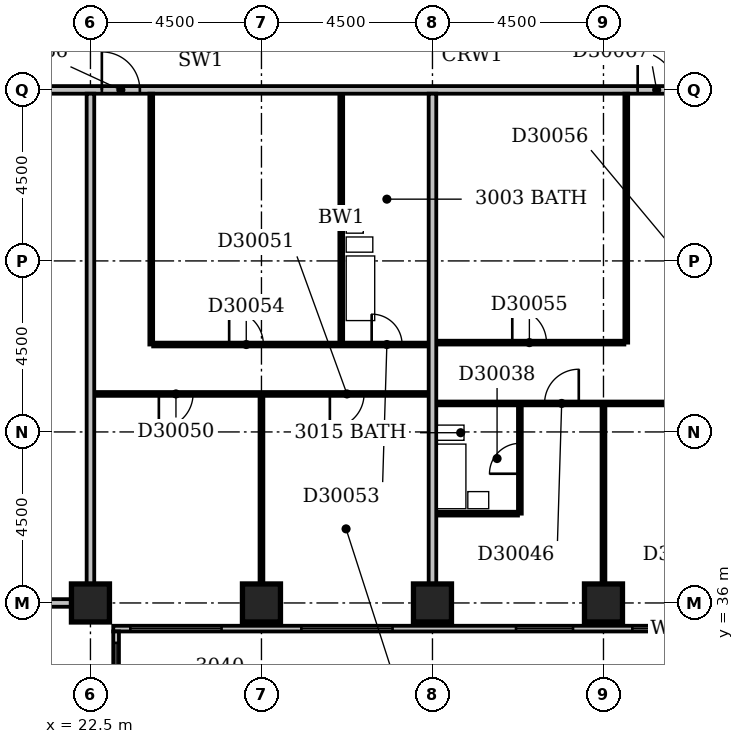
"""IFC4 building model, lengths in metres.
Left out: names, types, materials, properties, quantities, classifications, styles, units other than length and angle.
Written with IfcOpenShell. Run it as: python <this file> out.ifc"""

import sys

from ifc_helpers import new_model, si_unit, direction, frame, frame_2d, origin, origin_2d, place, context, subcontext, project, spatial, rectangle, extrude, element, fill, save


model = new_model("IFC4")
c1 = context("Model", 3, precision=1e-05, world=origin(), true_north=direction((0.0, 1.0)))
c2 = subcontext(c1, "Body", "Model", "MODEL_VIEW")
j1 = project(units=[si_unit("LENGTHUNIT", "METRE"), si_unit("PLANEANGLEUNIT", "RADIAN")], contexts=[c1])
p1 = place(None, origin())
s1 = spatial("IfcSite", under=j1, at=p1, CompositionType="ELEMENT")
p2 = place(p1, origin())
s2 = spatial("IfcBuilding", under=s1, at=p2, CompositionType="ELEMENT")
p3 = place(p2, frame((0.0, 0.0, 123.2)))
s3 = spatial("IfcBuildingStorey", under=s2, at=p3, CompositionType="ELEMENT", Elevation=123.2)
for number, where, z_axis, x_axis in (
    (1, (22.5, 36.0, -0.3), (0.0, 0.0, 1.0), (1.0, 0.0, 0.0)),
    (2, (27.0, 36.0, -0.3), (0.0, 0.0, 1.0), (1.0, 0.0, 0.0)),
    (3, (31.5, 36.0, -0.3), (0.0, 0.0, 1.0), (1.0, 0.0, 0.0)),
    (4, (36.0, 36.0, -0.3), (0.0, 0.0, 1.0), (1.0, 0.0, 0.0)),
):
    element("IfcColumn", number, at=place(p3, frame(where, z_axis=z_axis, x_axis=x_axis)), inside=s3, PredefinedType="COLUMN", context=c2, shape_type="SweptSolid", body=[
        extrude(rectangle(XDim=1.0, YDim=1.0, at=origin_2d()), origin(), (0.0, 0.0, 1.0), 3.6),
    ])
p4 = place(p3, frame((23.175, 17.4, 0.0), z_axis=(0.0, 0.0, 1.0), x_axis=(0.0, 1.0, 0.0)))
e5 = element("IfcWall", 5, at=p4, inside=s3, PredefinedType="STANDARD", context=c2, shape_type="SweptSolid", body=[
    extrude(rectangle(XDim=17.85, YDim=0.15, at=frame_2d((8.925, 0.0))), origin(), (0.0, 0.0, 1.0), 2.7),
])
p5 = place(p4, frame((1.65, 0.0, 0.6)))
e6 = element("IfcOpeningElement", 6, at=p5, cuts=e5, PredefinedType="OPENING", context=c2, shape_type="SweptSolid", body=[
    extrude(rectangle(XDim=2.4, YDim=1.8, at=frame_2d((1.2, 0.9))), frame((0.0, 0.087, 0.0), z_axis=(0.0, -1.0, 0.0), x_axis=(1.0, 0.0, 0.0)), (0.0, 0.0, 1.0), 0.174),
])
p6 = place(p4, frame((6.15, 0.0, 0.6)))
e7 = element("IfcOpeningElement", 7, at=p6, cuts=e5, PredefinedType="OPENING", context=c2, shape_type="SweptSolid", body=[
    extrude(rectangle(XDim=2.4, YDim=1.8, at=frame_2d((1.2, 0.9))), frame((0.0, 0.087, 0.0), z_axis=(0.0, -1.0, 0.0), x_axis=(1.0, 0.0, 0.0)), (0.0, 0.0, 1.0), 0.174),
])
p7 = place(p4, frame((10.433, 0.0, 0.6)))
e8 = element("IfcOpeningElement", 8, at=p7, cuts=e5, PredefinedType="OPENING", context=c2, shape_type="SweptSolid", body=[
    extrude(rectangle(XDim=1.5, YDim=1.8, at=frame_2d((0.75, 0.9))), frame((0.0, 0.087, 0.0), z_axis=(0.0, -1.0, 0.0), x_axis=(1.0, 0.0, 0.0)), (0.0, 0.0, 1.0), 0.174),
])
p8 = place(p4, frame((15.15, 0.0, 0.6)))
e9 = element("IfcOpeningElement", 9, at=p8, cuts=e5, PredefinedType="OPENING", context=c2, shape_type="SweptSolid", body=[
    extrude(rectangle(XDim=2.4, YDim=1.8, at=frame_2d((1.2, 0.9))), frame((0.0, 0.087, 0.0), z_axis=(0.0, -1.0, 0.0), x_axis=(1.0, 0.0, 0.0)), (0.0, 0.0, 1.0), 0.174),
])
p9 = place(p3, frame((23.1, 35.325, 0.0), z_axis=(0.0, 0.0, 1.0), x_axis=(1.0, 0.0, 0.0)))
e10 = element("IfcWall", 10, at=p9, inside=s3, PredefinedType="STANDARD", context=c2, shape_type="SweptSolid", body=[
    extrude(rectangle(XDim=45.15, YDim=0.15, at=frame_2d((22.575, 0.0))), origin(), (0.0, 0.0, 1.0), 2.7),
])
p10 = place(p9, frame((0.45, 0.0, 0.6)))
e11 = element("IfcOpeningElement", 11, at=p10, cuts=e10, PredefinedType="OPENING", context=c2, shape_type="SweptSolid", body=[
    extrude(rectangle(XDim=2.4, YDim=1.8, at=frame_2d((1.2, 0.9))), frame((0.0, 0.087, 0.0), z_axis=(0.0, -1.0, 0.0), x_axis=(1.0, 0.0, 0.0)), (0.0, 0.0, 1.0), 0.174),
])
p11 = place(p9, frame((4.95, 0.0, 0.6)))
e12 = element("IfcOpeningElement", 12, at=p11, cuts=e10, PredefinedType="OPENING", context=c2, shape_type="SweptSolid", body=[
    extrude(rectangle(XDim=2.4, YDim=1.8, at=frame_2d((1.2, 0.9))), frame((0.0, 0.087, 0.0), z_axis=(0.0, -1.0, 0.0), x_axis=(1.0, 0.0, 0.0)), (0.0, 0.0, 1.0), 0.174),
])
p12 = place(p9, frame((10.598, 0.0, 0.6)))
e13 = element("IfcOpeningElement", 13, at=p12, cuts=e10, PredefinedType="OPENING", context=c2, shape_type="SweptSolid", body=[
    extrude(rectangle(XDim=1.5, YDim=1.8, at=frame_2d((0.75, 0.9))), frame((0.0, 0.087, 0.0), z_axis=(0.0, -1.0, 0.0), x_axis=(1.0, 0.0, 0.0)), (0.0, 0.0, 1.0), 0.174),
])
p13 = place(p9, frame((13.66, 0.0, 0.6)))
e14 = element("IfcOpeningElement", 14, at=p13, cuts=e10, PredefinedType="OPENING", context=c2, shape_type="SweptSolid", body=[
    extrude(rectangle(XDim=1.8, YDim=1.8, at=frame_2d((0.9, 0.9))), frame((0.0, 0.087, 0.0), z_axis=(0.0, -1.0, 0.0), x_axis=(1.0, 0.0, 0.0)), (0.0, 0.0, 1.0), 0.174),
])
p14 = place(p9, frame((18.45, 0.0, 0.6)))
e15 = element("IfcOpeningElement", 15, at=p14, cuts=e10, PredefinedType="OPENING", context=c2, shape_type="SweptSolid", body=[
    extrude(rectangle(XDim=2.4, YDim=1.8, at=frame_2d((1.2, 0.9))), frame((0.0, 0.087, 0.0), z_axis=(0.0, -1.0, 0.0), x_axis=(1.0, 0.0, 0.0)), (0.0, 0.0, 1.0), 0.174),
])
p15 = place(p9, frame((22.95, 0.0, 0.6)))
e16 = element("IfcOpeningElement", 16, at=p15, cuts=e10, PredefinedType="OPENING", context=c2, shape_type="SweptSolid", body=[
    extrude(rectangle(XDim=2.4, YDim=1.8, at=frame_2d((1.2, 0.9))), frame((0.0, 0.087, 0.0), z_axis=(0.0, -1.0, 0.0), x_axis=(1.0, 0.0, 0.0)), (0.0, 0.0, 1.0), 0.174),
])
p16 = place(p9, frame((27.45, 0.0, 0.6)))
e17 = element("IfcOpeningElement", 17, at=p16, cuts=e10, PredefinedType="OPENING", context=c2, shape_type="SweptSolid", body=[
    extrude(rectangle(XDim=2.4, YDim=1.8, at=frame_2d((1.2, 0.9))), frame((0.0, 0.087, 0.0), z_axis=(0.0, -1.0, 0.0), x_axis=(1.0, 0.0, 0.0)), (0.0, 0.0, 1.0), 0.174),
])
p17 = place(p9, frame((31.95, 0.0, 0.6)))
e18 = element("IfcOpeningElement", 18, at=p17, cuts=e10, PredefinedType="OPENING", context=c2, shape_type="SweptSolid", body=[
    extrude(rectangle(XDim=2.4, YDim=1.8, at=frame_2d((1.2, 0.9))), frame((0.0, 0.087, 0.0), z_axis=(0.0, -1.0, 0.0), x_axis=(1.0, 0.0, 0.0)), (0.0, 0.0, 1.0), 0.174),
])
p18 = place(p9, frame((36.131, 0.0, 0.6)))
e19 = element("IfcOpeningElement", 19, at=p18, cuts=e10, PredefinedType="OPENING", context=c2, shape_type="SweptSolid", body=[
    extrude(rectangle(XDim=2.4, YDim=1.8, at=frame_2d((1.2, 0.9))), frame((0.0, 0.087, 0.0), z_axis=(0.0, -1.0, 0.0), x_axis=(1.0, 0.0, 0.0)), (0.0, 0.0, 1.0), 0.174),
])
p19 = place(p9, frame((40.95, 0.0, 0.6)))
e20 = element("IfcOpeningElement", 20, at=p19, cuts=e10, PredefinedType="OPENING", context=c2, shape_type="SweptSolid", body=[
    extrude(rectangle(XDim=2.4, YDim=1.8, at=frame_2d((1.2, 0.9))), frame((0.0, 0.087, 0.0), z_axis=(0.0, -1.0, 0.0), x_axis=(1.0, 0.0, 0.0)), (0.0, 0.0, 1.0), 0.174),
])
for number, where, z_axis, x_axis in (
    (21, (9.1, 36.0, 0.0), (0.0, 0.0, 1.0), (1.0, 0.0, 0.0)),
    (22, (22.5, 36.5, 0.0), (0.0, 0.0, 1.0), (0.0, 1.0, 0.0)),
):
    element("IfcWall", number, at=place(p3, frame(where, z_axis=z_axis, x_axis=x_axis)), inside=s3, PredefinedType="PARTITIONING", context=c2, shape_type="SweptSolid", body=[
        extrude(rectangle(XDim=12.9, YDim=0.2, at=frame_2d((6.45, 0.0))), origin(), (0.0, 0.0, 1.0), 3.3),
    ])
p20 = place(p3, frame((27.0, 36.5, 0.0), z_axis=(0.0, 0.0, 1.0), x_axis=(0.0, 1.0, 0.0)))
e23 = element("IfcWall", 23, at=p20, inside=s3, PredefinedType="PARTITIONING", context=c2, shape_type="SweptSolid", body=[
    extrude(rectangle(XDim=4.95, YDim=0.1, at=frame_2d((2.475, 0.0))), origin(), (0.0, 0.0, 1.0), 2.6),
])
p21 = place(p3, frame((31.5, 36.5, 0.0), z_axis=(0.0, 0.0, 1.0), x_axis=(0.0, 1.0, 0.0)))
e24 = element("IfcWall", 24, at=p21, inside=s3, PredefinedType="PARTITIONING", context=c2, shape_type="SweptSolid", body=[
    extrude(rectangle(XDim=12.9, YDim=0.2, at=frame_2d((6.45, 0.0))), origin(), (0.0, 0.0, 1.0), 3.3),
])
p22 = place(p3, frame((36.0, 36.5, 0.0), z_axis=(0.0, 0.0, 1.0), x_axis=(0.0, 1.0, 0.0)))
e25 = element("IfcWall", 25, at=p22, inside=s3, PredefinedType="PARTITIONING", context=c2, shape_type="SweptSolid", body=[
    extrude(rectangle(XDim=4.7, YDim=0.1, at=frame_2d((2.35, 0.0))), origin(), (0.0, 0.0, 1.0), 2.4),
])
p23 = place(p3, frame((31.6, 38.35, 0.0), z_axis=(0.0, 0.0, 1.0), x_axis=(1.0, 0.0, 0.0)))
e26 = element("IfcWall", 26, at=p23, inside=s3, PredefinedType="PLUMBINGWALL", context=c2, shape_type="SweptSolid", body=[
    extrude(rectangle(XDim=2.15, YDim=0.1, at=frame_2d((1.075, 0.0))), origin(), (0.0, 0.0, 1.0), 3.3),
])
p24 = place(p3, frame((33.8, 38.35, 0.0), z_axis=(0.0, 0.0, 1.0), x_axis=(0.0, 1.0, 0.0)))
e27 = element("IfcWall", 27, at=p24, inside=s3, PredefinedType="PLUMBINGWALL", context=c2, shape_type="SweptSolid", body=[
    extrude(rectangle(XDim=2.85, YDim=0.1, at=frame_2d((1.425, 0.0))), origin(), (0.0, 0.0, 1.0), 3.3),
])
p25 = place(p24, frame((1.05, 0.0, 0.0)))
e28 = element("IfcOpeningElement", 28, at=p25, cuts=e27, PredefinedType="OPENING", context=c2, shape_type="SweptSolid", body=[
    extrude(rectangle(XDim=0.8, YDim=2.1, at=frame_2d((0.4, 1.05))), frame((0.0, 0.062, 0.0), z_axis=(0.0, -1.0, 0.0), x_axis=(1.0, 0.0, 0.0)), (0.0, 0.0, 1.0), 0.124),
])
p26 = place(p3, frame((31.6, 41.25, 0.0), z_axis=(0.0, 0.0, 1.0), x_axis=(1.0, 0.0, 0.0)))
e29 = element("IfcWall", 29, at=p26, inside=s3, PredefinedType="PARTITIONING", context=c2, shape_type="SweptSolid", body=[
    extrude(rectangle(XDim=17.8, YDim=0.1, at=frame_2d((8.9, 0.0))), origin(), (0.0, 0.0, 1.0), 3.3),
])
p27 = place(p26, frame((2.85, 0.0, 0.0)))
e30 = element("IfcOpeningElement", 30, at=p27, cuts=e29, PredefinedType="OPENING", context=c2, shape_type="SweptSolid", body=[
    extrude(rectangle(XDim=0.9, YDim=2.1, at=frame_2d((0.45, 1.05))), frame((0.0, 0.062, 0.0), z_axis=(0.0, -1.0, 0.0), x_axis=(1.0, 0.0, 0.0)), (0.0, 0.0, 1.0), 0.124),
])
p28 = place(p26, frame((8.4, 0.0, 0.0)))
e31 = element("IfcOpeningElement", 31, at=p28, cuts=e29, PredefinedType="OPENING", context=c2, shape_type="SweptSolid", body=[
    extrude(rectangle(XDim=0.9, YDim=2.1, at=frame_2d((0.45, 1.05))), frame((0.0, 0.062, 0.0), z_axis=(0.0, -1.0, 0.0), x_axis=(1.0, 0.0, 0.0)), (0.0, 0.0, 1.0), 0.124),
])
p29 = place(p26, frame((14.05, 0.0, 0.0)))
e32 = element("IfcOpeningElement", 32, at=p29, cuts=e29, PredefinedType="OPENING", context=c2, shape_type="SweptSolid", body=[
    extrude(rectangle(XDim=0.9, YDim=2.1, at=frame_2d((0.45, 1.05))), frame((0.0, 0.062, 0.0), z_axis=(0.0, -1.0, 0.0), x_axis=(1.0, 0.0, 0.0)), (0.0, 0.0, 1.0), 0.124),
])
p30 = place(p3, frame((22.6, 41.5, 0.0), z_axis=(0.0, 0.0, 1.0), x_axis=(1.0, 0.0, 0.0)))
e33 = element("IfcWall", 33, at=p30, inside=s3, PredefinedType="PARTITIONING", context=c2, shape_type="SweptSolid", body=[
    extrude(rectangle(XDim=8.8, YDim=0.1, at=frame_2d((4.4, 0.0))), origin(), (0.0, 0.0, 1.0), 3.3),
])
p31 = place(p30, frame((1.7, 0.0, 0.0)))
e34 = element("IfcOpeningElement", 34, at=p31, cuts=e33, PredefinedType="OPENING", context=c2, shape_type="SweptSolid", body=[
    extrude(rectangle(XDim=0.9, YDim=2.1, at=frame_2d((0.45, 1.05))), frame((0.0, 0.062, 0.0), z_axis=(0.0, -1.0, 0.0), x_axis=(1.0, 0.0, 0.0)), (0.0, 0.0, 1.0), 0.124),
])
p32 = place(p30, frame((6.2, 0.0, 0.0)))
e35 = element("IfcOpeningElement", 35, at=p32, cuts=e33, PredefinedType="OPENING", context=c2, shape_type="SweptSolid", body=[
    extrude(rectangle(XDim=0.9, YDim=2.1, at=frame_2d((0.45, 1.05))), frame((0.0, 0.062, 0.0), z_axis=(0.0, -1.0, 0.0), x_axis=(1.0, 0.0, 0.0)), (0.0, 0.0, 1.0), 0.124),
])
p33 = place(p3, frame((24.1, 42.8, 0.0), z_axis=(0.0, 0.0, 1.0), x_axis=(0.0, 1.0, 0.0)))
e36 = element("IfcWall", 36, at=p33, inside=s3, PredefinedType="PARTITIONING", context=c2, shape_type="SweptSolid", body=[
    extrude(rectangle(XDim=6.6, YDim=0.1, at=frame_2d((3.3, 0.0))), origin(), (0.0, 0.0, 1.0), 3.3),
])
p34 = place(p3, frame((24.15, 42.8, 0.0), z_axis=(0.0, 0.0, 1.0), x_axis=(1.0, 0.0, 0.0)))
e37 = element("IfcWall", 37, at=p34, inside=s3, PredefinedType="PARTITIONING", context=c2, shape_type="SweptSolid", body=[
    extrude(rectangle(XDim=7.25, YDim=0.1, at=frame_2d((3.625, 0.0))), origin(), (0.0, 0.0, 1.0), 3.3),
])
p35 = place(p34, frame((5.75, 0.0, 0.0)))
e38 = element("IfcOpeningElement", 38, at=p35, cuts=e37, PredefinedType="OPENING", context=c2, shape_type="SweptSolid", body=[
    extrude(rectangle(XDim=0.8, YDim=2.1, at=frame_2d((0.4, 1.05))), frame((0.0, 0.062, 0.0), z_axis=(0.0, -1.0, 0.0), x_axis=(1.0, 0.0, 0.0)), (0.0, 0.0, 1.0), 0.124),
])
p36 = place(p34, frame((2.0, 0.0, 0.0)))
e39 = element("IfcOpeningElement", 39, at=p36, cuts=e37, PredefinedType="OPENING", context=c2, shape_type="SweptSolid", body=[
    extrude(rectangle(XDim=0.9, YDim=2.1, at=frame_2d((0.45, 1.05))), frame((0.0, 0.062, 0.0), z_axis=(0.0, -1.0, 0.0), x_axis=(1.0, 0.0, 0.0)), (0.0, 0.0, 1.0), 0.124),
])
p37 = place(p3, frame((29.1, 42.85, 0.0), z_axis=(0.0, 0.0, 1.0), x_axis=(0.0, 1.0, 0.0)))
e40 = element("IfcWall", 40, at=p37, inside=s3, PredefinedType="PLUMBINGWALL", context=c2, shape_type="SweptSolid", body=[
    extrude(rectangle(XDim=6.55, YDim=0.1, at=frame_2d((3.275, 0.0))), origin(), (0.0, 0.0, 1.0), 3.3),
])
p38 = place(p3, frame((31.6, 42.85, 0.0), z_axis=(0.0, 0.0, 1.0), x_axis=(1.0, 0.0, 0.0)))
e41 = element("IfcWall", 41, at=p38, inside=s3, PredefinedType="PARTITIONING", context=c2, shape_type="SweptSolid", body=[
    extrude(rectangle(XDim=4.95, YDim=0.1, at=frame_2d((2.475, 0.0))), origin(), (0.0, 0.0, 1.0), 3.3),
])
p39 = place(p38, frame((2.0, 0.0, 0.0)))
e42 = element("IfcOpeningElement", 42, at=p39, cuts=e41, PredefinedType="OPENING", context=c2, shape_type="SweptSolid", body=[
    extrude(rectangle(XDim=0.9, YDim=2.1, at=frame_2d((0.45, 1.05))), frame((0.0, 0.062, 0.0), z_axis=(0.0, -1.0, 0.0), x_axis=(1.0, 0.0, 0.0)), (0.0, 0.0, 1.0), 0.124),
])
p40 = place(p3, frame((36.6, 42.85, 0.0), z_axis=(0.0, 0.0, 1.0), x_axis=(0.0, 1.0, 0.0)))
e43 = element("IfcWall", 43, at=p40, inside=s3, PredefinedType="PARTITIONING", context=c2, shape_type="SweptSolid", body=[
    extrude(rectangle(XDim=6.55, YDim=0.1, at=frame_2d((3.275, 0.0))), origin(), (0.0, 0.0, 1.0), 2.4),
])
p41 = place(p3, frame((9.1, 49.5, 0.0), z_axis=(0.0, 0.0, 1.0), x_axis=(1.0, 0.0, 0.0)))
e44 = element("IfcWall", 44, at=p41, inside=s3, PredefinedType="PARTITIONING", context=c2, shape_type="SweptSolid", body=[
    extrude(rectangle(XDim=41.55, YDim=0.2, at=frame_2d((20.775, 0.0))), origin(), (0.0, 0.0, 1.0), 3.3),
])
p42 = place(p41, frame((13.7, 0.0, 0.0)))
e45 = element("IfcOpeningElement", 45, at=p42, cuts=e44, PredefinedType="OPENING", context=c2, shape_type="SweptSolid", body=[
    extrude(rectangle(XDim=1.0, YDim=2.1, at=frame_2d((0.5, 1.05))), frame((0.0, 0.112, 0.0), z_axis=(0.0, -1.0, 0.0), x_axis=(1.0, 0.0, 0.0)), (0.0, 0.0, 1.0), 0.224),
])
p43 = place(p41, frame((27.8, 0.0, 0.0)))
e46 = element("IfcOpeningElement", 46, at=p43, cuts=e44, PredefinedType="OPENING", context=c2, shape_type="SweptSolid", body=[
    extrude(rectangle(XDim=1.0, YDim=2.1, at=frame_2d((0.5, 1.05))), frame((0.0, 0.112, 0.0), z_axis=(0.0, -1.0, 0.0), x_axis=(1.0, 0.0, 0.0)), (0.0, 0.0, 1.0), 0.224),
])
p44 = place(p41, frame((8.4, 0.0, 0.0)))
e47 = element("IfcOpeningElement", 47, at=p44, cuts=e44, PredefinedType="OPENING", context=c2, shape_type="SweptSolid", body=[
    extrude(rectangle(XDim=0.9, YDim=2.1, at=frame_2d((0.45, 1.05))), frame((0.0, 0.112, 0.0), z_axis=(0.0, -1.0, 0.0), x_axis=(1.0, 0.0, 0.0)), (0.0, 0.0, 1.0), 0.224),
])
p45 = place(p8, origin())
e48 = element("IfcWindow", 48, at=p45, inside=s3, PartitioningType="SINGLE_PANEL", PredefinedType="WINDOW", context=c2, shape_type="SweptSolid", body=[
    extrude(rectangle(XDim=2.4, YDim=1.8, at=frame_2d((1.2, 0.9))), frame((0.0, 0.03, 0.0), z_axis=(0.0, -1.0, 0.0), x_axis=(1.0, 0.0, 0.0)), (0.0, 0.0, 1.0), 0.06),
])
fill(e9, e48)
p46 = place(p10, origin())
e49 = element("IfcWindow", 49, at=p46, inside=s3, PartitioningType="SINGLE_PANEL", PredefinedType="WINDOW", context=c2, shape_type="SweptSolid", body=[
    extrude(rectangle(XDim=2.4, YDim=1.8, at=frame_2d((1.2, 0.9))), frame((0.0, 0.03, 0.0), z_axis=(0.0, -1.0, 0.0), x_axis=(1.0, 0.0, 0.0)), (0.0, 0.0, 1.0), 0.06),
])
fill(e11, e49)
p47 = place(p11, origin())
e50 = element("IfcWindow", 50, at=p47, inside=s3, PartitioningType="SINGLE_PANEL", PredefinedType="WINDOW", context=c2, shape_type="SweptSolid", body=[
    extrude(rectangle(XDim=2.4, YDim=1.8, at=frame_2d((1.2, 0.9))), frame((0.0, 0.03, 0.0), z_axis=(0.0, -1.0, 0.0), x_axis=(1.0, 0.0, 0.0)), (0.0, 0.0, 1.0), 0.06),
])
fill(e12, e50)
p48 = place(p12, origin())
e51 = element("IfcWindow", 51, at=p48, inside=s3, PartitioningType="SINGLE_PANEL", PredefinedType="WINDOW", context=c2, shape_type="SweptSolid", body=[
    extrude(rectangle(XDim=1.5, YDim=1.8, at=frame_2d((0.75, 0.9))), frame((0.0, 0.03, 0.0), z_axis=(0.0, -1.0, 0.0), x_axis=(1.0, 0.0, 0.0)), (0.0, 0.0, 1.0), 0.06),
])
fill(e13, e51)
p49 = place(p13, origin())
e52 = element("IfcWindow", 52, at=p49, inside=s3, PartitioningType="SINGLE_PANEL", PredefinedType="WINDOW", context=c2, shape_type="SweptSolid", body=[
    extrude(rectangle(XDim=1.8, YDim=1.8, at=frame_2d((0.9, 0.9))), frame((0.0, 0.03, 0.0), z_axis=(0.0, -1.0, 0.0), x_axis=(1.0, 0.0, 0.0)), (0.0, 0.0, 1.0), 0.06),
])
fill(e14, e52)
p50 = place(p25, origin())
e53 = element("IfcDoor", 53, at=p50, inside=s3, OperationType="SINGLE_SWING_LEFT", PredefinedType="DOOR", context=c2, shape_type="SweptSolid", body=[
    extrude(rectangle(XDim=0.8, YDim=2.1, at=frame_2d((0.4, 1.05))), frame((0.0, 0.025, 0.0), z_axis=(0.0, -1.0, 0.0), x_axis=(1.0, 0.0, 0.0)), (0.0, 0.0, 1.0), 0.05),
])
fill(e28, e53)
p51 = place(p27, frame((0.9, 0.0, 0.0), z_axis=(0.0, 0.0, 1.0), x_axis=(-1.0, 0.0, 0.0)))
e54 = element("IfcDoor", 54, at=p51, inside=s3, OperationType="SINGLE_SWING_LEFT", PredefinedType="DOOR", context=c2, shape_type="SweptSolid", body=[
    extrude(rectangle(XDim=0.9, YDim=2.1, at=frame_2d((0.45, 1.05))), frame((0.0, 0.025, 0.0), z_axis=(0.0, -1.0, 0.0), x_axis=(1.0, 0.0, 0.0)), (0.0, 0.0, 1.0), 0.05),
])
fill(e30, e54)
p52 = place(p31, frame((0.9, 0.0, 0.0), z_axis=(0.0, 0.0, 1.0), x_axis=(-1.0, 0.0, 0.0)))
e55 = element("IfcDoor", 55, at=p52, inside=s3, OperationType="SINGLE_SWING_RIGHT", PredefinedType="DOOR", context=c2, shape_type="SweptSolid", body=[
    extrude(rectangle(XDim=0.9, YDim=2.1, at=frame_2d((0.45, 1.05))), frame((0.0, 0.025, 0.0), z_axis=(0.0, -1.0, 0.0), x_axis=(1.0, 0.0, 0.0)), (0.0, 0.0, 1.0), 0.05),
])
fill(e34, e55)
p53 = place(p32, frame((0.9, 0.0, 0.0), z_axis=(0.0, 0.0, 1.0), x_axis=(-1.0, 0.0, 0.0)))
e56 = element("IfcDoor", 56, at=p53, inside=s3, OperationType="SINGLE_SWING_RIGHT", PredefinedType="DOOR", context=c2, shape_type="SweptSolid", body=[
    extrude(rectangle(XDim=0.9, YDim=2.1, at=frame_2d((0.45, 1.05))), frame((0.0, 0.025, 0.0), z_axis=(0.0, -1.0, 0.0), x_axis=(1.0, 0.0, 0.0)), (0.0, 0.0, 1.0), 0.05),
])
fill(e35, e56)
p54 = place(p35, origin())
e57 = element("IfcDoor", 57, at=p54, inside=s3, OperationType="SINGLE_SWING_LEFT", PredefinedType="DOOR", context=c2, shape_type="SweptSolid", body=[
    extrude(rectangle(XDim=0.8, YDim=2.1, at=frame_2d((0.4, 1.05))), frame((0.0, 0.025, 0.0), z_axis=(0.0, -1.0, 0.0), x_axis=(1.0, 0.0, 0.0)), (0.0, 0.0, 1.0), 0.05),
])
fill(e38, e57)
p55 = place(p36, origin())
e58 = element("IfcDoor", 58, at=p55, inside=s3, OperationType="SINGLE_SWING_LEFT", PredefinedType="DOOR", context=c2, shape_type="SweptSolid", body=[
    extrude(rectangle(XDim=0.9, YDim=2.1, at=frame_2d((0.45, 1.05))), frame((0.0, 0.025, 0.0), z_axis=(0.0, -1.0, 0.0), x_axis=(1.0, 0.0, 0.0)), (0.0, 0.0, 1.0), 0.05),
])
fill(e39, e58)
p56 = place(p39, origin())
e59 = element("IfcDoor", 59, at=p56, inside=s3, OperationType="SINGLE_SWING_LEFT", PredefinedType="DOOR", context=c2, shape_type="SweptSolid", body=[
    extrude(rectangle(XDim=0.9, YDim=2.1, at=frame_2d((0.45, 1.05))), frame((0.0, 0.025, 0.0), z_axis=(0.0, -1.0, 0.0), x_axis=(1.0, 0.0, 0.0)), (0.0, 0.0, 1.0), 0.05),
])
fill(e42, e59)
p57 = place(p42, origin())
e60 = element("IfcDoor", 60, at=p57, inside=s3, OperationType="SINGLE_SWING_LEFT", PredefinedType="DOOR", context=c2, shape_type="SweptSolid", body=[
    extrude(rectangle(XDim=1.0, YDim=2.1, at=frame_2d((0.5, 1.05))), frame((0.0, 0.025, 0.0), z_axis=(0.0, -1.0, 0.0), x_axis=(1.0, 0.0, 0.0)), (0.0, 0.0, 1.0), 0.05),
])
fill(e45, e60)
p58 = place(p43, origin())
e61 = element("IfcDoor", 61, at=p58, inside=s3, OperationType="SINGLE_SWING_LEFT", PredefinedType="DOOR", context=c2, shape_type="SweptSolid", body=[
    extrude(rectangle(XDim=1.0, YDim=2.1, at=frame_2d((0.5, 1.05))), frame((0.0, 0.025, 0.0), z_axis=(0.0, -1.0, 0.0), x_axis=(1.0, 0.0, 0.0)), (0.0, 0.0, 1.0), 0.05),
])
fill(e46, e61)
save(model, sys.argv[1])
